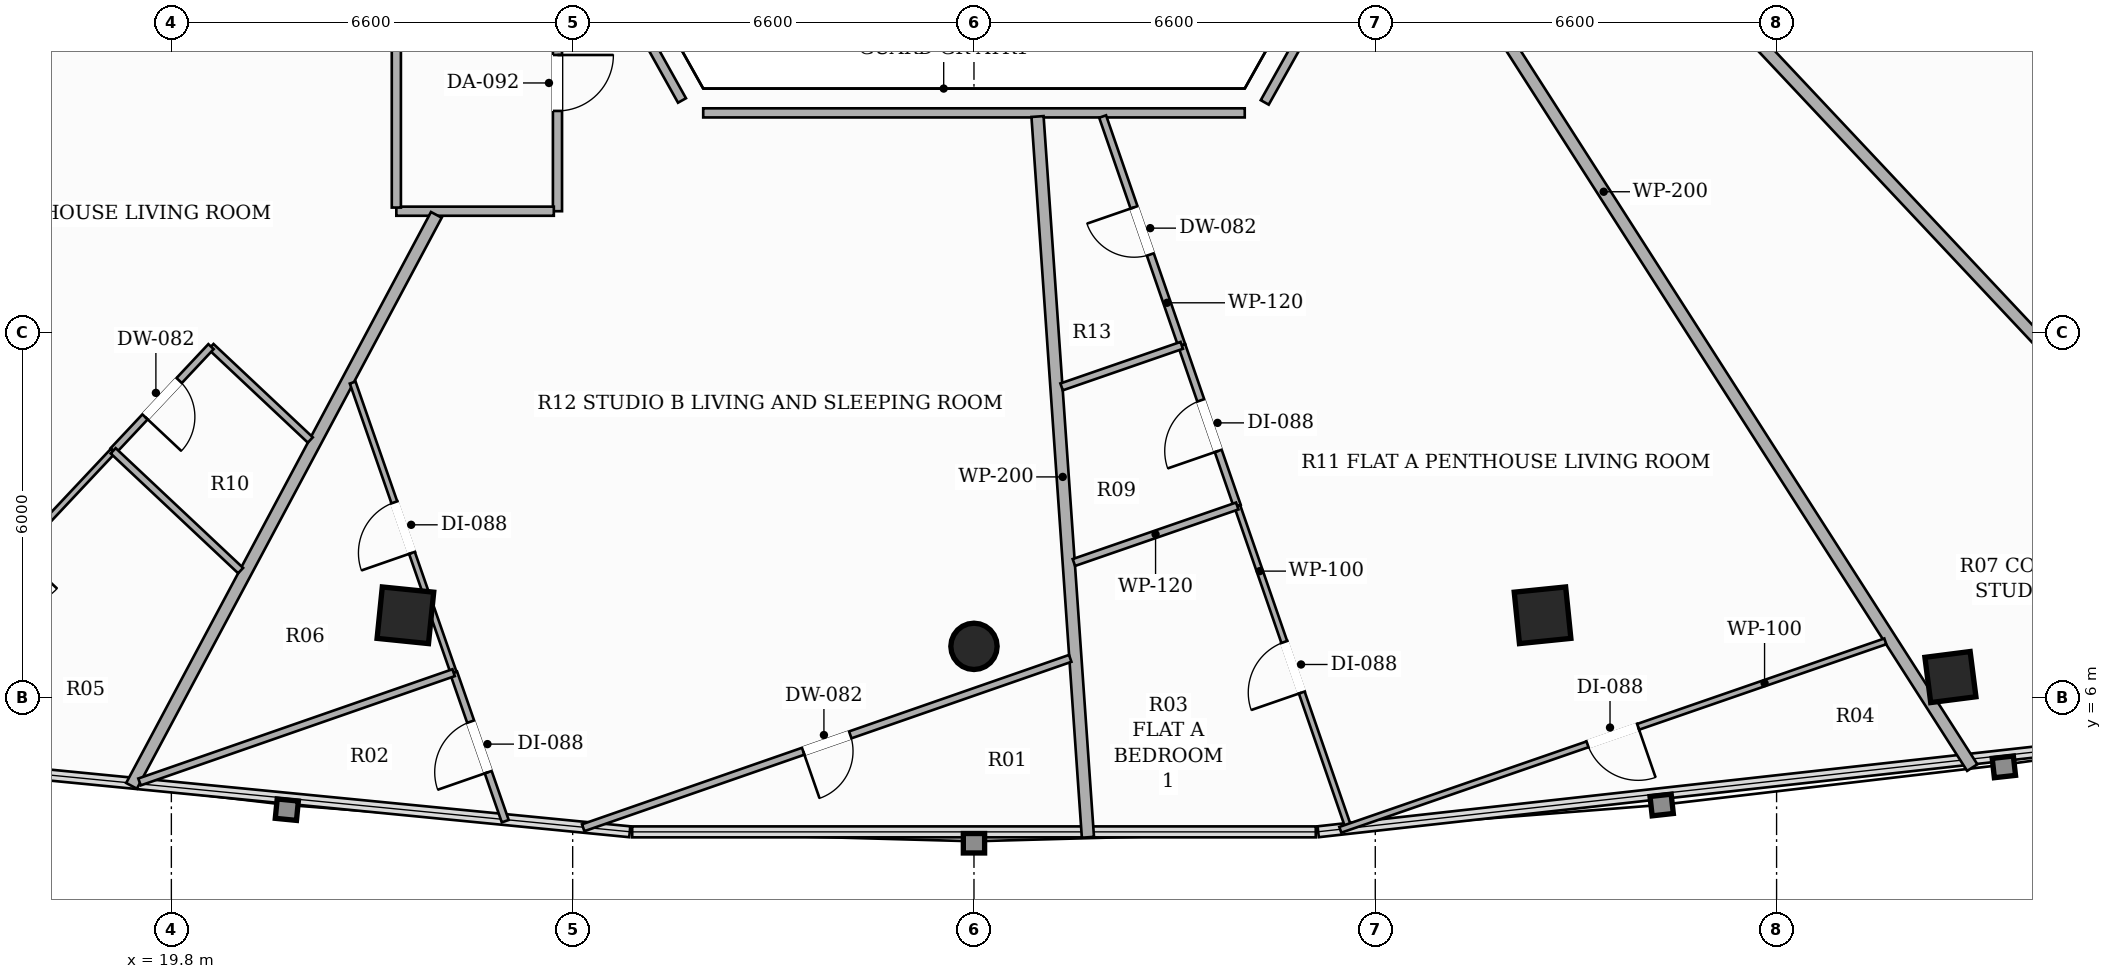
"""IFC4 building model, lengths in metres.
Left out: names, types, materials, properties, quantities, classifications, styles, units other than length and angle.
Written with IfcOpenShell. Run it as: python <this file> out.ifc"""

import sys

from ifc_helpers import new_model, si_unit, direction, frame, frame_2d, origin, origin_2d, place, context, subcontext, project, spatial, rectangle, hollow_rectangle, hollow_circle, extrude, element, fill, save


model = new_model("IFC4")
c1 = context("Model", 3, precision=1e-05, world=origin(), true_north=direction((0.0, 1.0)))
c2 = subcontext(c1, "Body", "Model", "MODEL_VIEW")
j1 = project(units=[si_unit("LENGTHUNIT", "METRE"), si_unit("PLANEANGLEUNIT", "RADIAN")], contexts=[c1])
p1 = place(None, origin())
s1 = spatial("IfcSite", under=j1, at=p1, CompositionType="ELEMENT")
p2 = place(p1, origin())
s2 = spatial("IfcBuilding", under=s1, at=p2, CompositionType="ELEMENT")
p3 = place(p2, frame((0.0, 0.0, 160.55)))
s3 = spatial("IfcBuildingStorey", under=s2, at=p3, CompositionType="ELEMENT", Elevation=160.55)
p4 = place(p3, frame((23.649, 7.355, 0.0), z_axis=(0.0, 0.0, 1.0), x_axis=(-0.994880708829, 0.101056297183, 0.0)))
e1 = element("IfcColumn", 1, at=p4, inside=s3, PredefinedType="COLUMN", context=c2, shape_type="SweptSolid", body=[
    extrude(hollow_rectangle(XDim=0.85, YDim=0.85, WallThickness=0.028, at=origin_2d()), origin(), (0.0, 0.0, 1.0), 3.3),
])
p5 = place(p3, frame((33.0, 6.844, 0.0), z_axis=(0.0, 0.0, 1.0), x_axis=(1.0, 0.0, 0.0)))
e2 = element("IfcColumn", 2, at=p5, inside=s3, PredefinedType="COLUMN", context=c2, shape_type="SweptSolid", body=[
    extrude(hollow_circle(Radius=0.381, WallThickness=0.022, at=origin_2d()), origin(), (0.0, 0.0, 1.0), 3.3),
])
p6 = place(p3, frame((42.351, 7.355, 0.0), z_axis=(0.0, 0.0, 1.0), x_axis=(0.994880708829, 0.101056297183, 0.0)))
e3 = element("IfcColumn", 3, at=p6, inside=s3, PredefinedType="COLUMN", context=c2, shape_type="SweptSolid", body=[
    extrude(hollow_rectangle(XDim=0.85, YDim=0.85, WallThickness=0.028, at=origin_2d()), origin(), (0.0, 0.0, 1.0), 3.3),
])
p7 = place(p3, frame((49.059, 6.339, 0.0), z_axis=(0.0, 0.0, 1.0), x_axis=(0.99189444259, 0.127064608601, 0.0)))
e4 = element("IfcColumn", 4, at=p7, inside=s3, PredefinedType="COLUMN", context=c2, shape_type="SweptSolid", body=[
    extrude(hollow_rectangle(XDim=0.75, YDim=0.75, WallThickness=0.025, at=origin_2d()), origin(), (0.0, 0.0, 1.0), 3.3),
])
p8 = place(p3, frame((26.15, 23.79, 0.0), z_axis=(0.0, 0.0, 1.0), x_axis=(0.0, -1.0, 0.0)))
e5 = element("IfcWall", 5, at=p8, inside=s3, PredefinedType="PARTITIONING", context=c2, shape_type="SweptSolid", body=[
    extrude(rectangle(XDim=9.79, YDim=0.15, at=frame_2d((4.895, 0.0))), origin(), (0.0, 0.0, 1.0), 2.721),
])
p9 = place(p8, frame((7.221, 0.0, 0.0)))
e6 = element("IfcOpeningElement", 6, at=p9, cuts=e5, PredefinedType="OPENING", context=c2, shape_type="SweptSolid", body=[
    extrude(rectangle(XDim=0.92, YDim=2.15, at=frame_2d((0.46, 1.075))), frame((0.0, 0.085, 0.0), z_axis=(0.0, -1.0, 0.0), x_axis=(1.0, 0.0, 0.0)), (0.0, 0.0, 1.0), 0.17),
])
p10 = place(p3, frame((26.09, 14.0, 0.0), z_axis=(0.0, 0.0, 1.0), x_axis=(-1.0, 0.0, 0.0)))
e7 = element("IfcWall", 7, at=p10, inside=s3, PredefinedType="PARTITIONING", context=c2, shape_type="SweptSolid", body=[
    extrude(rectangle(XDim=2.59, YDim=0.15, at=frame_2d((1.295, 0.0))), origin(), (0.0, 0.0, 1.0), 2.721),
])
p11 = place(p3, frame((23.5, 14.06, 0.0), z_axis=(0.0, 0.0, 1.0), x_axis=(0.0, 1.0, 0.0)))
e8 = element("IfcWall", 8, at=p11, inside=s3, PredefinedType="PARTITIONING", context=c2, shape_type="SweptSolid", body=[
    extrude(rectangle(XDim=22.84, YDim=0.15, at=frame_2d((11.42, 0.0))), origin(), (0.0, 0.0, 1.0), 2.413),
])
p12 = place(p11, frame((4.064, 0.0, 0.0)))
e9 = element("IfcOpeningElement", 9, at=p12, cuts=e8, PredefinedType="OPENING", context=c2, shape_type="SweptSolid", body=[
    extrude(rectangle(XDim=0.92, YDim=2.15, at=frame_2d((0.46, 1.075))), frame((0.0, 0.085, 0.0), z_axis=(0.0, -1.0, 0.0), x_axis=(1.0, 0.0, 0.0)), (0.0, 0.0, 1.0), 0.17),
])
p13 = place(p11, frame((13.047, 0.0, 0.0)))
e10 = element("IfcOpeningElement", 10, at=p13, cuts=e8, PredefinedType="OPENING", context=c2, shape_type="SweptSolid", body=[
    extrude(rectangle(XDim=0.88, YDim=2.1, at=frame_2d((0.44, 1.05))), frame((0.0, 0.085, 0.0), z_axis=(0.0, -1.0, 0.0), x_axis=(1.0, 0.0, 0.0)), (0.0, 0.0, 1.0), 0.17),
])
p14 = place(p11, frame((19.953, 0.0, 0.0)))
e11 = element("IfcOpeningElement", 11, at=p14, cuts=e8, PredefinedType="OPENING", context=c2, shape_type="SweptSolid", body=[
    extrude(rectangle(XDim=0.92, YDim=2.15, at=frame_2d((0.46, 1.075))), frame((0.0, 0.085, 0.0), z_axis=(0.0, -1.0, 0.0), x_axis=(1.0, 0.0, 0.0)), (0.0, 0.0, 1.0), 0.17),
])
p15 = place(p3, frame((38.276, 16.67, 0.0), z_axis=(0.0, 0.0, 1.0), x_axis=(-0.489067077696, -0.872246177127, 0.0)))
e12 = element("IfcWall", 12, at=p15, inside=s3, PredefinedType="PARTITIONING", context=c2, shape_type="SweptSolid", body=[
    extrude(rectangle(XDim=1.01, YDim=0.15, at=frame_2d((0.505, 0.0))), origin(), (0.0, 0.0, 1.0), 3.06),
])
p16 = place(p3, frame((37.453, 15.617, 0.0), z_axis=(0.0, 0.0, 1.0), x_axis=(-1.0, 0.0, 0.0)))
e13 = element("IfcWall", 13, at=p16, inside=s3, PredefinedType="PARTITIONING", context=c2, shape_type="SweptSolid", body=[
    extrude(rectangle(XDim=8.906, YDim=0.15, at=frame_2d((4.453, 0.0))), origin(), (0.0, 0.0, 1.0), 2.721),
])
p17 = place(p3, frame((28.198, 15.821, 0.0), z_axis=(0.0, 0.0, 1.0), x_axis=(-0.487432951818, 0.873160419099, 0.0)))
e14 = element("IfcWall", 14, at=p17, inside=s3, PredefinedType="PARTITIONING", context=c2, shape_type="SweptSolid", body=[
    extrude(rectangle(XDim=0.972, YDim=0.15, at=frame_2d((0.486, 0.0))), origin(), (0.0, 0.0, 1.0), 3.06),
])
p18 = place(p3, frame((34.874, 3.704, 0.0), z_axis=(0.0, 0.0, 1.0), x_axis=(-0.069779440561, 0.997562443998, 0.0)))
e15 = element("IfcWall", 15, at=p18, inside=s3, PredefinedType="PARTITIONING", context=c2, shape_type="SweptSolid", body=[
    extrude(rectangle(XDim=11.882, YDim=0.2, at=frame_2d((5.941, 0.0))), origin(), (0.0, 0.0, 1.0), 2.413),
])
p19 = place(p3, frame((37.295, 23.79, 0.0), z_axis=(0.0, 0.0, 1.0), x_axis=(0.539100523601, -0.842241429433, 0.0)))
e16 = element("IfcWall", 16, at=p19, inside=s3, PredefinedType="PARTITIONING", context=c2, shape_type="SweptSolid", body=[
    extrude(rectangle(XDim=22.488, YDim=0.2, at=frame_2d((11.244, 0.0))), origin(), (0.0, 0.0, 1.0), 2.413),
])
p20 = place(p3, frame((19.145, 4.55, 0.0), z_axis=(0.0, 0.0, 1.0), x_axis=(0.470953669838, 0.882157945533, 0.0)))
e17 = element("IfcWall", 17, at=p20, inside=s3, PredefinedType="PARTITIONING", context=c2, shape_type="SweptSolid", body=[
    extrude(rectangle(XDim=10.644, YDim=0.2, at=frame_2d((5.322, 0.0))), origin(), (0.0, 0.0, 1.0), 2.413),
])
p21 = place(p3, frame((8.887, 10.973, 0.0), z_axis=(0.0, 0.0, 1.0), x_axis=(0.777135864284, 0.629332859815, 0.0)))
e18 = element("IfcWall", 18, at=p21, inside=s3, PredefinedType="PARTITIONING", context=c2, shape_type="SweptSolid", body=[
    extrude(rectangle(XDim=18.726, YDim=0.2, at=frame_2d((9.363, 0.0))), origin(), (0.0, 0.0, 1.0), 2.413),
])
p22 = place(p3, frame((55.896, 13.865, 0.0), z_axis=(0.0, 0.0, 1.0), x_axis=(-0.809001736781, 0.587806251995, 0.0)))
e19 = element("IfcWall", 19, at=p22, inside=s3, PredefinedType="PARTITIONING", context=c2, shape_type="SweptSolid", body=[
    extrude(rectangle(XDim=16.885, YDim=0.2, at=frame_2d((8.442, 0.0))), origin(), (0.0, 0.0, 1.0), 2.413),
])
p23 = place(p3, frame((56.122, 5.904, 0.0), z_axis=(0.0, 0.0, 1.0), x_axis=(-0.684934612975, 0.728604540165, 0.0)))
e20 = element("IfcWall", 20, at=p23, inside=s3, PredefinedType="PARTITIONING", context=c2, shape_type="SweptSolid", body=[
    extrude(rectangle(XDim=24.548, YDim=0.2, at=frame_2d((12.274, 0.0))), origin(), (0.0, 0.0, 1.0), 2.413),
])
p24 = place(p3, frame((36.417, 11.794, 0.0), z_axis=(0.0, 0.0, 1.0), x_axis=(-0.326767254884, 0.945104841346, 0.0)))
e21 = element("IfcWall", 21, at=p24, inside=s3, PredefinedType="PARTITIONING", context=c2, shape_type="SweptSolid", body=[
    extrude(rectangle(XDim=3.981, YDim=0.12, at=frame_2d((1.991, 0.0))), origin(), (0.0, 0.0, 1.0), 3.06),
])
p25 = place(p24, frame((1.581, 0.0, 0.0)))
e22 = element("IfcOpeningElement", 22, at=p25, cuts=e21, PredefinedType="OPENING", context=c2, shape_type="SweptSolid", body=[
    extrude(rectangle(XDim=0.82, YDim=2.1, at=frame_2d((0.41, 1.05))), frame((0.0, 0.07, 0.0), z_axis=(0.0, -1.0, 0.0), x_axis=(1.0, 0.0, 0.0)), (0.0, 0.0, 1.0), 0.14),
])
p26 = place(p3, frame((37.33, 9.152, 0.0), z_axis=(0.0, 0.0, 1.0), x_axis=(-0.326663542442, 0.945140693251, 0.0)))
e23 = element("IfcWall", 23, at=p26, inside=s3, PredefinedType="PARTITIONING", context=c2, shape_type="SweptSolid", body=[
    extrude(rectangle(XDim=2.795, YDim=0.12, at=frame_2d((1.397, 0.0))), origin(), (0.0, 0.0, 1.0), 2.721),
])
p27 = place(p26, frame((0.958, 0.0, 0.0)))
e24 = element("IfcOpeningElement", 24, at=p27, cuts=e23, PredefinedType="OPENING", context=c2, shape_type="SweptSolid", body=[
    extrude(rectangle(XDim=0.88, YDim=2.1, at=frame_2d((0.44, 1.05))), frame((0.0, 0.07, 0.0), z_axis=(0.0, -1.0, 0.0), x_axis=(1.0, 0.0, 0.0)), (0.0, 0.0, 1.0), 0.14),
])
p28 = place(p3, frame((39.164, 3.848, 0.0), z_axis=(0.0, 0.0, 1.0), x_axis=(-0.326778856457, 0.945100830056, 0.0)))
e25 = element("IfcWall", 25, at=p28, inside=s3, PredefinedType="PARTITIONING", context=c2, shape_type="SweptSolid", body=[
    extrude(rectangle(XDim=5.612, YDim=0.1, at=frame_2d((2.806, 0.0))), origin(), (0.0, 0.0, 1.0), 2.413),
])
p29 = place(p28, frame((2.366, 0.0, 0.0)))
e26 = element("IfcOpeningElement", 26, at=p29, cuts=e25, PredefinedType="OPENING", context=c2, shape_type="SweptSolid", body=[
    extrude(rectangle(XDim=0.88, YDim=2.1, at=frame_2d((0.44, 1.05))), frame((0.0, 0.06, 0.0), z_axis=(0.0, -1.0, 0.0), x_axis=(1.0, 0.0, 0.0)), (0.0, 0.0, 1.0), 0.12),
])
p30 = place(p3, frame((47.988, 6.926, 0.0), z_axis=(0.0, 0.0, 1.0), x_axis=(-0.945100175753, -0.326780748809, 0.0)))
e27 = element("IfcWall", 27, at=p30, inside=s3, PredefinedType="PARTITIONING", context=c2, shape_type="SweptSolid", body=[
    extrude(rectangle(XDim=9.484, YDim=0.1, at=frame_2d((4.742, 0.0))), origin(), (0.0, 0.0, 1.0), 2.413),
])
p31 = place(p30, frame((4.302, 0.0, 0.0)))
e28 = element("IfcOpeningElement", 28, at=p31, cuts=e27, PredefinedType="OPENING", context=c2, shape_type="SweptSolid", body=[
    extrude(rectangle(XDim=0.88, YDim=2.1, at=frame_2d((0.44, 1.05))), frame((0.0, 0.06, 0.0), z_axis=(0.0, -1.0, 0.0), x_axis=(1.0, 0.0, 0.0)), (0.0, 0.0, 1.0), 0.12),
])
p32 = place(p3, frame((36.417, 11.794, 0.0), z_axis=(0.0, 0.0, 1.0), x_axis=(-0.945158093584, -0.326613193446, 0.0)))
e29 = element("IfcWall", 29, at=p32, inside=s3, PredefinedType="PARTITIONING", context=c2, shape_type="SweptSolid", body=[
    extrude(rectangle(XDim=2.091, YDim=0.12, at=frame_2d((1.045, 0.0))), origin(), (0.0, 0.0, 1.0), 3.06),
])
p33 = place(p3, frame((37.33, 9.152, 0.0), z_axis=(0.0, 0.0, 1.0), x_axis=(-0.945086078656, -0.326821516933, 0.0)))
e30 = element("IfcWall", 30, at=p33, inside=s3, PredefinedType="PARTITIONING", context=c2, shape_type="SweptSolid", body=[
    extrude(rectangle(XDim=2.843, YDim=0.12, at=frame_2d((1.422, 0.0))), origin(), (0.0, 0.0, 1.0), 2.721),
])
p34 = place(p3, frame((34.583, 6.646, 0.0), z_axis=(0.0, 0.0, 1.0), x_axis=(-0.944539899325, -0.328396678704, 0.0)))
e31 = element("IfcWall", 31, at=p34, inside=s3, PredefinedType="PARTITIONING", context=c2, shape_type="SweptSolid", body=[
    extrude(rectangle(XDim=8.48, YDim=0.12, at=frame_2d((4.24, 0.0))), origin(), (0.0, 0.0, 1.0), 2.413),
])
p35 = place(p34, frame((3.83, 0.0, 0.0)))
e32 = element("IfcOpeningElement", 32, at=p35, cuts=e31, PredefinedType="OPENING", context=c2, shape_type="SweptSolid", body=[
    extrude(rectangle(XDim=0.82, YDim=2.1, at=frame_2d((0.41, 1.05))), frame((0.0, 0.07, 0.0), z_axis=(0.0, -1.0, 0.0), x_axis=(1.0, 0.0, 0.0)), (0.0, 0.0, 1.0), 0.14),
])
p36 = place(p3, frame((25.291, 3.969, 0.0), z_axis=(0.0, 0.0, 1.0), x_axis=(-0.328440044658, 0.944524820778, 0.0)))
e33 = element("IfcWall", 33, at=p36, inside=s3, PredefinedType="PARTITIONING", context=c2, shape_type="SweptSolid", body=[
    extrude(rectangle(XDim=2.585, YDim=0.12, at=frame_2d((1.292, 0.0))), origin(), (0.0, 0.0, 1.0), 3.06),
])
p37 = place(p36, frame((0.853, 0.0, 0.0)))
e34 = element("IfcOpeningElement", 34, at=p37, cuts=e33, PredefinedType="OPENING", context=c2, shape_type="SweptSolid", body=[
    extrude(rectangle(XDim=0.88, YDim=2.1, at=frame_2d((0.44, 1.05))), frame((0.0, 0.07, 0.0), z_axis=(0.0, -1.0, 0.0), x_axis=(1.0, 0.0, 0.0)), (0.0, 0.0, 1.0), 0.14),
])
p38 = place(p3, frame((24.442, 6.411, 0.0), z_axis=(0.0, 0.0, 1.0), x_axis=(-0.328597479572, 0.944470061155, 0.0)))
e35 = element("IfcWall", 35, at=p38, inside=s3, PredefinedType="PARTITIONING", context=c2, shape_type="SweptSolid", body=[
    extrude(rectangle(XDim=5.052, YDim=0.1, at=frame_2d((2.526, 0.0))), origin(), (0.0, 0.0, 1.0), 2.413),
])
p39 = place(p38, frame((2.086, 0.0, 0.0)))
e36 = element("IfcOpeningElement", 36, at=p39, cuts=e35, PredefinedType="OPENING", context=c2, shape_type="SweptSolid", body=[
    extrude(rectangle(XDim=0.88, YDim=2.1, at=frame_2d((0.44, 1.05))), frame((0.0, 0.06, 0.0), z_axis=(0.0, -1.0, 0.0), x_axis=(1.0, 0.0, 0.0)), (0.0, 0.0, 1.0), 0.12),
])
p40 = place(p3, frame((19.276, 4.614, 0.0), z_axis=(0.0, 0.0, 1.0), x_axis=(0.944496796706, 0.328520624941, 0.0)))
e37 = element("IfcWall", 37, at=p40, inside=s3, PredefinedType="PARTITIONING", context=c2, shape_type="SweptSolid", body=[
    extrude(rectangle(XDim=5.469, YDim=0.12, at=frame_2d((2.735, 0.0))), origin(), (0.0, 0.0, 1.0), 2.619),
])
p41 = place(p3, frame((22.085, 10.238, 0.0), z_axis=(0.0, 0.0, 1.0), x_axis=(-0.728663547615, 0.684871837921, 0.0)))
e38 = element("IfcWall", 38, at=p41, inside=s3, PredefinedType="PARTITIONING", context=c2, shape_type="SweptSolid", body=[
    extrude(rectangle(XDim=2.241, YDim=0.12, at=frame_2d((1.121, 0.0))), origin(), (0.0, 0.0, 1.0), 2.721),
])
p42 = place(p3, frame((20.452, 11.773, 0.0), z_axis=(0.0, 0.0, 1.0), x_axis=(-0.684631978878, -0.728888917118, 0.0)))
e39 = element("IfcWall", 39, at=p42, inside=s3, PredefinedType="PARTITIONING", context=c2, shape_type="SweptSolid", body=[
    extrude(rectangle(XDim=2.35, YDim=0.12, at=frame_2d((1.175, 0.0))), origin(), (0.0, 0.0, 1.0), 2.721),
])
p43 = place(p42, frame((0.765, 0.0, 0.0)))
e40 = element("IfcOpeningElement", 40, at=p43, cuts=e39, PredefinedType="OPENING", context=c2, shape_type="SweptSolid", body=[
    extrude(rectangle(XDim=0.82, YDim=2.1, at=frame_2d((0.41, 1.05))), frame((0.0, 0.07, 0.0), z_axis=(0.0, -1.0, 0.0), x_axis=(1.0, 0.0, 0.0)), (0.0, 0.0, 1.0), 0.14),
])
p44 = place(p3, frame((18.843, 10.06, 0.0), z_axis=(0.0, 0.0, 1.0), x_axis=(-0.6848274704, -0.728705246163, 0.0)))
e41 = element("IfcWall", 41, at=p44, inside=s3, PredefinedType="PARTITIONING", context=c2, shape_type="SweptSolid", body=[
    extrude(rectangle(XDim=6.721, YDim=0.1, at=frame_2d((3.361, 0.0))), origin(), (0.0, 0.0, 1.0), 2.413),
])
p45 = place(p44, frame((2.283, 0.0, 0.0)))
e42 = element("IfcOpeningElement", 42, at=p45, cuts=e41, PredefinedType="OPENING", context=c2, shape_type="SweptSolid", body=[
    extrude(rectangle(XDim=0.88, YDim=2.1, at=frame_2d((0.44, 1.05))), frame((0.0, 0.06, 0.0), z_axis=(0.0, -1.0, 0.0), x_axis=(1.0, 0.0, 0.0)), (0.0, 0.0, 1.0), 0.12),
])
p46 = place(p3, frame((20.939, 8.09, 0.0), z_axis=(0.0, 0.0, 1.0), x_axis=(-0.728665789254, 0.68486945294, 0.0)))
e43 = element("IfcWall", 43, at=p46, inside=s3, PredefinedType="PARTITIONING", context=c2, shape_type="SweptSolid", body=[
    extrude(rectangle(XDim=2.876, YDim=0.12, at=frame_2d((1.438, 0.0))), origin(), (0.0, 0.0, 1.0), 2.721),
])
p47 = place(p25, origin())
e44 = element("IfcDoor", 44, at=p47, inside=s3, OperationType="SINGLE_SWING_RIGHT", PredefinedType="DOOR", context=c2, shape_type="SweptSolid", body=[
    extrude(rectangle(XDim=0.82, YDim=2.1, at=frame_2d((0.41, 1.05))), frame((0.0, 0.025, 0.0), z_axis=(0.0, -1.0, 0.0), x_axis=(1.0, 0.0, 0.0)), (0.0, 0.0, 1.0), 0.05),
])
fill(e22, e44)
p48 = place(p27, origin())
e45 = element("IfcDoor", 45, at=p48, inside=s3, OperationType="SINGLE_SWING_LEFT", PredefinedType="DOOR", context=c2, shape_type="SweptSolid", body=[
    extrude(rectangle(XDim=0.88, YDim=2.1, at=frame_2d((0.44, 1.05))), frame((0.0, 0.025, 0.0), z_axis=(0.0, -1.0, 0.0), x_axis=(1.0, 0.0, 0.0)), (0.0, 0.0, 1.0), 0.05),
])
fill(e24, e45)
p49 = place(p29, origin())
e46 = element("IfcDoor", 46, at=p49, inside=s3, OperationType="SINGLE_SWING_LEFT", PredefinedType="DOOR", context=c2, shape_type="SweptSolid", body=[
    extrude(rectangle(XDim=0.88, YDim=2.1, at=frame_2d((0.44, 1.05))), frame((0.0, 0.025, 0.0), z_axis=(0.0, -1.0, 0.0), x_axis=(1.0, 0.0, 0.0)), (0.0, 0.0, 1.0), 0.05),
])
fill(e26, e46)
p50 = place(p31, origin())
e47 = element("IfcDoor", 47, at=p50, inside=s3, OperationType="SINGLE_SWING_LEFT", PredefinedType="DOOR", context=c2, shape_type="SweptSolid", body=[
    extrude(rectangle(XDim=0.88, YDim=2.1, at=frame_2d((0.44, 1.05))), frame((0.0, 0.025, 0.0), z_axis=(0.0, -1.0, 0.0), x_axis=(1.0, 0.0, 0.0)), (0.0, 0.0, 1.0), 0.05),
])
fill(e28, e47)
p51 = place(p9, origin())
e48 = element("IfcDoor", 48, at=p51, inside=s3, OperationType="SINGLE_SWING_LEFT", PredefinedType="DOOR", context=c2, shape_type="SweptSolid", body=[
    extrude(rectangle(XDim=0.92, YDim=2.15, at=frame_2d((0.46, 1.075))), frame((0.0, 0.025, 0.0), z_axis=(0.0, -1.0, 0.0), x_axis=(1.0, 0.0, 0.0)), (0.0, 0.0, 1.0), 0.05),
])
fill(e6, e48)
p52 = place(p35, origin())
e49 = element("IfcDoor", 49, at=p52, inside=s3, OperationType="SINGLE_SWING_RIGHT", PredefinedType="DOOR", context=c2, shape_type="SweptSolid", body=[
    extrude(rectangle(XDim=0.82, YDim=2.1, at=frame_2d((0.41, 1.05))), frame((0.0, 0.025, 0.0), z_axis=(0.0, -1.0, 0.0), x_axis=(1.0, 0.0, 0.0)), (0.0, 0.0, 1.0), 0.05),
])
fill(e32, e49)
p53 = place(p37, origin())
e50 = element("IfcDoor", 50, at=p53, inside=s3, OperationType="SINGLE_SWING_LEFT", PredefinedType="DOOR", context=c2, shape_type="SweptSolid", body=[
    extrude(rectangle(XDim=0.88, YDim=2.1, at=frame_2d((0.44, 1.05))), frame((0.0, 0.025, 0.0), z_axis=(0.0, -1.0, 0.0), x_axis=(1.0, 0.0, 0.0)), (0.0, 0.0, 1.0), 0.05),
])
fill(e34, e50)
p54 = place(p39, origin())
e51 = element("IfcDoor", 51, at=p54, inside=s3, OperationType="SINGLE_SWING_LEFT", PredefinedType="DOOR", context=c2, shape_type="SweptSolid", body=[
    extrude(rectangle(XDim=0.88, YDim=2.1, at=frame_2d((0.44, 1.05))), frame((0.0, 0.025, 0.0), z_axis=(0.0, -1.0, 0.0), x_axis=(1.0, 0.0, 0.0)), (0.0, 0.0, 1.0), 0.05),
])
fill(e36, e51)
p55 = place(p43, origin())
e52 = element("IfcDoor", 52, at=p55, inside=s3, OperationType="SINGLE_SWING_RIGHT", PredefinedType="DOOR", context=c2, shape_type="SweptSolid", body=[
    extrude(rectangle(XDim=0.82, YDim=2.1, at=frame_2d((0.41, 1.05))), frame((0.0, 0.025, 0.0), z_axis=(0.0, -1.0, 0.0), x_axis=(1.0, 0.0, 0.0)), (0.0, 0.0, 1.0), 0.05),
])
fill(e40, e52)
save(model, sys.argv[1])
